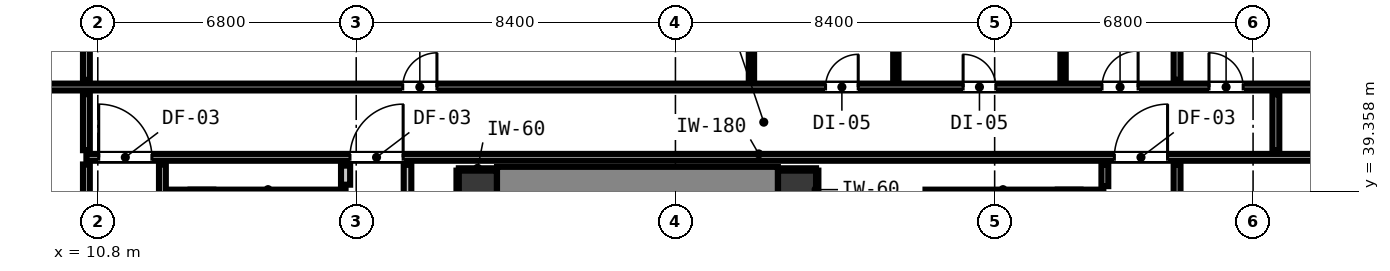
"""IFC4 building model, lengths in metres.
Left out: names, types, materials, properties, quantities, classifications, styles, units other than length and angle.
Written with IfcOpenShell. Run it as: python <this file> out.ifc"""

import sys

from ifc_helpers import new_model, si_unit, direction, frame, frame_2d, origin, origin_2d, place, context, subcontext, project, spatial, rectangle, extrude, element, fill, save


model = new_model("IFC4")
c1 = context("Model", 3, precision=1e-05, world=origin(), true_north=direction((0.0, 1.0)))
c2 = subcontext(c1, "Body", "Model", "MODEL_VIEW")
j1 = project(units=[si_unit("LENGTHUNIT", "METRE"), si_unit("PLANEANGLEUNIT", "RADIAN")], contexts=[c1])
p1 = place(None, origin())
s1 = spatial("IfcSite", under=j1, at=p1, CompositionType="ELEMENT")
p2 = place(p1, origin())
s2 = spatial("IfcBuilding", under=s1, at=p2, CompositionType="ELEMENT")
p3 = place(p2, frame((0.0, 0.0, 17.8)))
s3 = spatial("IfcBuildingStorey", under=s2, at=p3, CompositionType="ELEMENT", Elevation=17.8)
for number, where, z_axis, x_axis in (
    (1, (20.8, 39.4, 0.0), (0.0, 0.0, 1.0), (1.0, 0.0, 0.0)),
    (2, (29.2, 39.4, 0.0), (0.0, 0.0, 1.0), (1.0, 0.0, 0.0)),
):
    element("IfcColumn", number, at=place(p3, frame(where, z_axis=z_axis, x_axis=x_axis)), inside=s3, PredefinedType="COLUMN", context=c2, shape_type="SweptSolid", body=[
        extrude(rectangle(XDim=1.0, YDim=1.0, at=origin_2d()), origin(), (0.0, 0.0, 1.0), 4.2),
    ])
p4 = place(p3, frame((13.24, 31.205, 0.0), z_axis=(0.0, 0.0, 1.0), x_axis=(0.0, 1.0, 0.0)))
e3 = element("IfcWall", 3, at=p4, inside=s3, PredefinedType="SHEAR", context=c2, shape_type="SweptSolid", body=[
    extrude(rectangle(XDim=8.195, YDim=1.2, at=frame_2d((4.097, 0.0))), origin(), (0.0, 0.0, 1.0), 4.2),
])
p5 = place(p3, frame((13.24, 39.1, 0.0), z_axis=(0.0, 0.0, 1.0), x_axis=(1.0, 0.0, 0.0)))
e4 = element("IfcWall", 4, at=p5, inside=s3, PredefinedType="SHEAR", context=c2, shape_type="SweptSolid", body=[
    extrude(rectangle(XDim=4.08, YDim=0.6, at=frame_2d((2.04, 0.0))), origin(), (0.0, 0.0, 1.0), 4.2),
])
p6 = place(p3, frame((36.66, 31.205, 0.0), z_axis=(0.0, 0.0, 1.0), x_axis=(0.0, 1.0, 0.0)))
e5 = element("IfcWall", 5, at=p6, inside=s3, PredefinedType="SHEAR", context=c2, shape_type="SweptSolid", body=[
    extrude(rectangle(XDim=8.195, YDim=1.2, at=frame_2d((4.097, 0.0))), origin(), (0.0, 0.0, 1.0), 4.2),
])
p7 = place(p3, frame((32.58, 39.1, 0.0), z_axis=(0.0, 0.0, 1.0), x_axis=(1.0, 0.0, 0.0)))
e6 = element("IfcWall", 6, at=p7, inside=s3, PredefinedType="SHEAR", context=c2, shape_type="SweptSolid", body=[
    extrude(rectangle(XDim=4.08, YDim=0.6, at=frame_2d((2.04, 0.0))), origin(), (0.0, 0.0, 1.0), 4.2),
])
p8 = place(p3, frame((21.305, 39.4, 0.0), z_axis=(0.0, 0.0, 1.0), x_axis=(1.0, 0.0, 0.0)))
e7 = element("IfcWall", 7, at=p8, inside=s3, PredefinedType="SHEAR", context=c2, shape_type="SweptSolid", body=[
    extrude(rectangle(XDim=7.39, YDim=1.2, at=frame_2d((3.695, 0.0))), origin(), (0.0, 0.0, 1.0), 4.2),
])
p9 = place(p3, frame((10.5, 40.25, 0.0), z_axis=(0.0, 0.0, 1.0), x_axis=(1.0, 0.0, 0.0)))
e8 = element("IfcWall", 8, at=p9, inside=s3, PredefinedType="PARTITIONING", context=c2, shape_type="SweptSolid", body=[
    extrude(rectangle(XDim=37.2, YDim=0.18, at=frame_2d((18.6, 0.0))), origin(), (0.0, 0.0, 1.0), 3.78),
])
p10 = place(p9, frame((6.935, 0.0, 0.0)))
e9 = element("IfcOpeningElement", 9, at=p10, cuts=e8, PredefinedType="OPENING", context=c2, shape_type="SweptSolid", body=[
    extrude(rectangle(XDim=1.4, YDim=2.15, at=frame_2d((0.7, 1.075))), frame((0.0, 0.1, 0.0), z_axis=(0.0, -1.0, 0.0), x_axis=(1.0, 0.0, 0.0)), (0.0, 0.0, 1.0), 0.2),
])
p11 = place(p9, frame((0.324, 0.0, 0.0)))
e10 = element("IfcOpeningElement", 10, at=p11, cuts=e8, PredefinedType="OPENING", context=c2, shape_type="SweptSolid", body=[
    extrude(rectangle(XDim=1.4, YDim=2.15, at=frame_2d((0.7, 1.075))), frame((0.0, 0.1, 0.0), z_axis=(0.0, -1.0, 0.0), x_axis=(1.0, 0.0, 0.0)), (0.0, 0.0, 1.0), 0.2),
])
p12 = place(p9, frame((27.05, 0.0, 0.0)))
e11 = element("IfcOpeningElement", 11, at=p12, cuts=e8, PredefinedType="OPENING", context=c2, shape_type="SweptSolid", body=[
    extrude(rectangle(XDim=1.4, YDim=2.15, at=frame_2d((0.7, 1.075))), frame((0.0, 0.1, 0.0), z_axis=(0.0, -1.0, 0.0), x_axis=(1.0, 0.0, 0.0)), (0.0, 0.0, 1.0), 0.2),
])
p13 = place(p3, frame((4.352, 42.1, 0.0), z_axis=(0.0, 0.0, 1.0), x_axis=(1.0, 0.0, 0.0)))
e12 = element("IfcWall", 12, at=p13, inside=s3, PredefinedType="PARTITIONING", context=c2, shape_type="SweptSolid", body=[
    extrude(rectangle(XDim=43.296, YDim=0.18, at=frame_2d((21.648, 0.0))), origin(), (0.0, 0.0, 1.0), 3.78),
])
p14 = place(p13, frame((14.472, 0.0, 0.0)))
e13 = element("IfcOpeningElement", 13, at=p14, cuts=e12, PredefinedType="OPENING", context=c2, shape_type="SweptSolid", body=[
    extrude(rectangle(XDim=0.9, YDim=2.1, at=frame_2d((0.45, 1.05))), frame((0.0, 0.1, 0.0), z_axis=(0.0, -1.0, 0.0), x_axis=(1.0, 0.0, 0.0)), (0.0, 0.0, 1.0), 0.2),
])
p15 = place(p13, frame((25.598, 0.0, 0.0)))
e14 = element("IfcOpeningElement", 14, at=p15, cuts=e12, PredefinedType="OPENING", context=c2, shape_type="SweptSolid", body=[
    extrude(rectangle(XDim=0.86, YDim=2.02, at=frame_2d((0.43, 1.01))), frame((0.0, 0.1, 0.0), z_axis=(0.0, -1.0, 0.0), x_axis=(1.0, 0.0, 0.0)), (0.0, 0.0, 1.0), 0.2),
])
p16 = place(p13, frame((29.218, 0.0, 0.0)))
e15 = element("IfcOpeningElement", 15, at=p16, cuts=e12, PredefinedType="OPENING", context=c2, shape_type="SweptSolid", body=[
    extrude(rectangle(XDim=0.86, YDim=2.02, at=frame_2d((0.43, 1.01))), frame((0.0, 0.1, 0.0), z_axis=(0.0, -1.0, 0.0), x_axis=(1.0, 0.0, 0.0)), (0.0, 0.0, 1.0), 0.2),
])
p17 = place(p13, frame((32.873, 0.0, 0.0)))
e16 = element("IfcOpeningElement", 16, at=p17, cuts=e12, PredefinedType="OPENING", context=c2, shape_type="SweptSolid", body=[
    extrude(rectangle(XDim=0.95, YDim=2.1, at=frame_2d((0.475, 1.05))), frame((0.0, 0.1, 0.0), z_axis=(0.0, -1.0, 0.0), x_axis=(1.0, 0.0, 0.0)), (0.0, 0.0, 1.0), 0.2),
])
p18 = place(p13, frame((35.688, 0.0, 0.0)))
e17 = element("IfcOpeningElement", 17, at=p18, cuts=e12, PredefinedType="OPENING", context=c2, shape_type="SweptSolid", body=[
    extrude(rectangle(XDim=0.9, YDim=2.1, at=frame_2d((0.45, 1.05))), frame((0.0, 0.1, 0.0), z_axis=(0.0, -1.0, 0.0), x_axis=(1.0, 0.0, 0.0)), (0.0, 0.0, 1.0), 0.2),
])
p19 = place(p3, frame((17.32, 39.53, 0.0), z_axis=(0.0, 0.0, 1.0), x_axis=(0.0, 1.0, 0.0)))
e18 = element("IfcWall", 18, at=p19, inside=s3, PredefinedType="PARTITIONING", context=c2, shape_type="SweptSolid", body=[
    extrude(rectangle(XDim=0.502, YDim=0.24, at=frame_2d((0.251, 0.0))), origin(), (0.0, 0.0, 1.0), 3.78),
])
p20 = place(p3, frame((18.95, 38.928, 0.0), z_axis=(0.0, 0.0, 1.0), x_axis=(0.0, 1.0, 0.0)))
e19 = element("IfcWall", 19, at=p20, inside=s3, PredefinedType="PARTITIONING", context=c2, shape_type="SweptSolid", body=[
    extrude(rectangle(XDim=1.124, YDim=0.2, at=frame_2d((0.562, 0.0))), origin(), (0.0, 0.0, 1.0), 3.78),
])
p21 = place(p3, frame((10.5, 21.368, 0.0), z_axis=(0.0, 0.0, 1.0), x_axis=(0.0, 1.0, 0.0)))
e20 = element("IfcWall", 20, at=p21, inside=s3, PredefinedType="PARTITIONING", context=c2, shape_type="SweptSolid", body=[
    extrude(rectangle(XDim=18.694, YDim=0.18, at=frame_2d((9.347, 0.0))), origin(), (0.0, 0.0, 1.0), 3.78),
])
p22 = place(p3, frame((10.5, 40.438, 0.0), z_axis=(0.0, 0.0, 1.0), x_axis=(0.0, 1.0, 0.0)))
e21 = element("IfcWall", 21, at=p22, inside=s3, PredefinedType="PARTITIONING", context=c2, shape_type="SweptSolid", body=[
    extrude(rectangle(XDim=1.474, YDim=0.18, at=frame_2d((0.737, 0.0))), origin(), (0.0, 0.0, 1.0), 3.78),
])
p23 = place(p3, frame((10.5, 42.288, 0.0), z_axis=(0.0, 0.0, 1.0), x_axis=(0.0, 1.0, 0.0)))
e22 = element("IfcWall", 22, at=p23, inside=s3, PredefinedType="PARTITIONING", context=c2, shape_type="SweptSolid", body=[
    extrude(rectangle(XDim=8.56, YDim=0.18, at=frame_2d((4.28, 0.0))), origin(), (0.0, 0.0, 1.0), 3.78),
])
p24 = place(p3, frame((12.5, 21.368, 0.0), z_axis=(0.0, 0.0, 1.0), x_axis=(0.0, 1.0, 0.0)))
e23 = element("IfcWall", 23, at=p24, inside=s3, PredefinedType="PARTITIONING", context=c2, shape_type="SweptSolid", body=[
    extrude(rectangle(XDim=18.694, YDim=0.18, at=frame_2d((9.347, 0.0))), origin(), (0.0, 0.0, 1.0), 3.78),
])
p25 = place(p3, frame((37.3, 39.492, 0.0), z_axis=(0.0, 0.0, 1.0), x_axis=(0.0, 1.0, 0.0)))
e24 = element("IfcWall", 24, at=p25, inside=s3, PredefinedType="PARTITIONING", context=c2, shape_type="SweptSolid", body=[
    extrude(rectangle(XDim=0.57, YDim=0.18, at=frame_2d((0.285, 0.0))), origin(), (0.0, 0.0, 1.0), 3.78),
])
p26 = place(p3, frame((39.2, 21.368, 0.0), z_axis=(0.0, 0.0, 1.0), x_axis=(0.0, 1.0, 0.0)))
e25 = element("IfcWall", 25, at=p26, inside=s3, PredefinedType="PARTITIONING", context=c2, shape_type="SweptSolid", body=[
    extrude(rectangle(XDim=18.694, YDim=0.18, at=frame_2d((9.347, 0.0))), origin(), (0.0, 0.0, 1.0), 3.78),
])
p27 = place(p3, frame((39.2, 42.288, 0.0), z_axis=(0.0, 0.0, 1.0), x_axis=(0.0, 1.0, 0.0)))
e26 = element("IfcWall", 26, at=p27, inside=s3, PredefinedType="PARTITIONING", context=c2, shape_type="SweptSolid", body=[
    extrude(rectangle(XDim=4.344, YDim=0.18, at=frame_2d((2.172, 0.0))), origin(), (0.0, 0.0, 1.0), 3.78),
])
p28 = place(p3, frame((41.8, 40.438, 0.0), z_axis=(0.0, 0.0, 1.0), x_axis=(0.0, 1.0, 0.0)))
e27 = element("IfcWall", 27, at=p28, inside=s3, PredefinedType="PARTITIONING", context=c2, shape_type="SweptSolid", body=[
    extrude(rectangle(XDim=1.474, YDim=0.18, at=frame_2d((0.737, 0.0))), origin(), (0.0, 0.0, 1.0), 3.78),
])
for number, where, z_axis, x_axis in (
    (28, (28.0, 42.268, 0.0), (0.0, 0.0, 1.0), (0.0, 1.0, 0.0)),
    (29, (31.8, 42.268, 0.0), (0.0, 0.0, 1.0), (0.0, 1.0, 0.0)),
):
    element("IfcWall", number, at=place(p3, frame(where, z_axis=z_axis, x_axis=x_axis)), inside=s3, PredefinedType="PARTITIONING", context=c2, shape_type="SweptSolid", body=[
        extrude(rectangle(XDim=4.384, YDim=0.14, at=frame_2d((2.192, 0.0))), origin(), (0.0, 0.0, 1.0), 3.78),
    ])
p29 = place(p3, frame((36.2, 42.268, 0.0), z_axis=(0.0, 0.0, 1.0), x_axis=(0.0, 1.0, 0.0)))
e30 = element("IfcWall", 30, at=p29, inside=s3, PredefinedType="PARTITIONING", context=c2, shape_type="SweptSolid", body=[
    extrude(rectangle(XDim=4.384, YDim=0.14, at=frame_2d((2.192, 0.0))), origin(), (0.0, 0.0, 1.0), 1.785),
])
p30 = place(p3, frame((20.3, 39.932, 0.0), z_axis=(0.0, 0.0, 1.0), x_axis=(1.0, 0.0, 0.0)))
e31 = element("IfcWall", 31, at=p30, inside=s3, PredefinedType="PARTITIONING", context=c2, shape_type="SweptSolid", body=[
    extrude(rectangle(XDim=0.99, YDim=0.06, at=frame_2d((0.495, 0.0))), origin(), (0.0, 0.0, 1.0), 1.45),
])
p31 = place(p3, frame((20.268, 38.9, 0.0), z_axis=(0.0, 0.0, 1.0), x_axis=(0.0, 1.0, 0.0)))
e32 = element("IfcWall", 32, at=p31, inside=s3, PredefinedType="PARTITIONING", context=c2, shape_type="SweptSolid", body=[
    extrude(rectangle(XDim=1.0, YDim=0.06, at=frame_2d((0.5, 0.0))), origin(), (0.0, 0.0, 1.0), 1.45),
])
p32 = place(p3, frame((28.71, 39.932, 0.0), z_axis=(0.0, 0.0, 1.0), x_axis=(1.0, 0.0, 0.0)))
e33 = element("IfcWall", 33, at=p32, inside=s3, PredefinedType="PARTITIONING", context=c2, shape_type="SweptSolid", body=[
    extrude(rectangle(XDim=0.99, YDim=0.06, at=frame_2d((0.495, 0.0))), origin(), (0.0, 0.0, 1.0), 1.45),
])
p33 = place(p3, frame((29.732, 38.9, 0.0), z_axis=(0.0, 0.0, 1.0), x_axis=(0.0, 1.0, 0.0)))
e34 = element("IfcWall", 34, at=p33, inside=s3, PredefinedType="PARTITIONING", context=c2, shape_type="SweptSolid", body=[
    extrude(rectangle(XDim=1.0, YDim=0.06, at=frame_2d((0.5, 0.0))), origin(), (0.0, 0.0, 1.0), 1.45),
])
p34 = place(p10, origin())
e35 = element("IfcDoor", 35, at=p34, inside=s3, OperationType="SINGLE_SWING_RIGHT", PredefinedType="DOOR", context=c2, shape_type="SweptSolid", body=[
    extrude(rectangle(XDim=1.4, YDim=2.15, at=frame_2d((0.7, 1.075))), frame((0.0, 0.025, 0.0), z_axis=(0.0, -1.0, 0.0), x_axis=(1.0, 0.0, 0.0)), (0.0, 0.0, 1.0), 0.05),
])
fill(e9, e35)
p35 = place(p11, origin())
e36 = element("IfcDoor", 36, at=p35, inside=s3, OperationType="SINGLE_SWING_LEFT", PredefinedType="DOOR", context=c2, shape_type="SweptSolid", body=[
    extrude(rectangle(XDim=1.4, YDim=2.15, at=frame_2d((0.7, 1.075))), frame((0.0, 0.025, 0.0), z_axis=(0.0, -1.0, 0.0), x_axis=(1.0, 0.0, 0.0)), (0.0, 0.0, 1.0), 0.05),
])
fill(e10, e36)
p36 = place(p12, origin())
e37 = element("IfcDoor", 37, at=p36, inside=s3, OperationType="SINGLE_SWING_RIGHT", PredefinedType="DOOR", context=c2, shape_type="SweptSolid", body=[
    extrude(rectangle(XDim=1.4, YDim=2.15, at=frame_2d((0.7, 1.075))), frame((0.0, 0.025, 0.0), z_axis=(0.0, -1.0, 0.0), x_axis=(1.0, 0.0, 0.0)), (0.0, 0.0, 1.0), 0.05),
])
fill(e11, e37)
p37 = place(p14, origin())
e38 = element("IfcDoor", 38, at=p37, inside=s3, OperationType="SINGLE_SWING_RIGHT", PredefinedType="DOOR", context=c2, shape_type="SweptSolid", body=[
    extrude(rectangle(XDim=0.9, YDim=2.1, at=frame_2d((0.45, 1.05))), frame((0.0, 0.025, 0.0), z_axis=(0.0, -1.0, 0.0), x_axis=(1.0, 0.0, 0.0)), (0.0, 0.0, 1.0), 0.05),
])
fill(e13, e38)
p38 = place(p15, origin())
e39 = element("IfcDoor", 39, at=p38, inside=s3, OperationType="SINGLE_SWING_RIGHT", PredefinedType="DOOR", context=c2, shape_type="SweptSolid", body=[
    extrude(rectangle(XDim=0.86, YDim=2.02, at=frame_2d((0.43, 1.01))), frame((0.0, 0.025, 0.0), z_axis=(0.0, -1.0, 0.0), x_axis=(1.0, 0.0, 0.0)), (0.0, 0.0, 1.0), 0.05),
])
fill(e14, e39)
p39 = place(p16, origin())
e40 = element("IfcDoor", 40, at=p39, inside=s3, OperationType="SINGLE_SWING_LEFT", PredefinedType="DOOR", context=c2, shape_type="SweptSolid", body=[
    extrude(rectangle(XDim=0.86, YDim=2.02, at=frame_2d((0.43, 1.01))), frame((0.0, 0.025, 0.0), z_axis=(0.0, -1.0, 0.0), x_axis=(1.0, 0.0, 0.0)), (0.0, 0.0, 1.0), 0.05),
])
fill(e15, e40)
p40 = place(p17, origin())
e41 = element("IfcDoor", 41, at=p40, inside=s3, OperationType="SINGLE_SWING_RIGHT", PredefinedType="DOOR", context=c2, shape_type="SweptSolid", body=[
    extrude(rectangle(XDim=0.95, YDim=2.1, at=frame_2d((0.475, 1.05))), frame((0.0, 0.025, 0.0), z_axis=(0.0, -1.0, 0.0), x_axis=(1.0, 0.0, 0.0)), (0.0, 0.0, 1.0), 0.05),
])
fill(e16, e41)
p41 = place(p18, origin())
e42 = element("IfcDoor", 42, at=p41, inside=s3, OperationType="SINGLE_SWING_LEFT", PredefinedType="DOOR", context=c2, shape_type="SweptSolid", body=[
    extrude(rectangle(XDim=0.9, YDim=2.1, at=frame_2d((0.45, 1.05))), frame((0.0, 0.025, 0.0), z_axis=(0.0, -1.0, 0.0), x_axis=(1.0, 0.0, 0.0)), (0.0, 0.0, 1.0), 0.05),
])
fill(e17, e42)
save(model, sys.argv[1])
